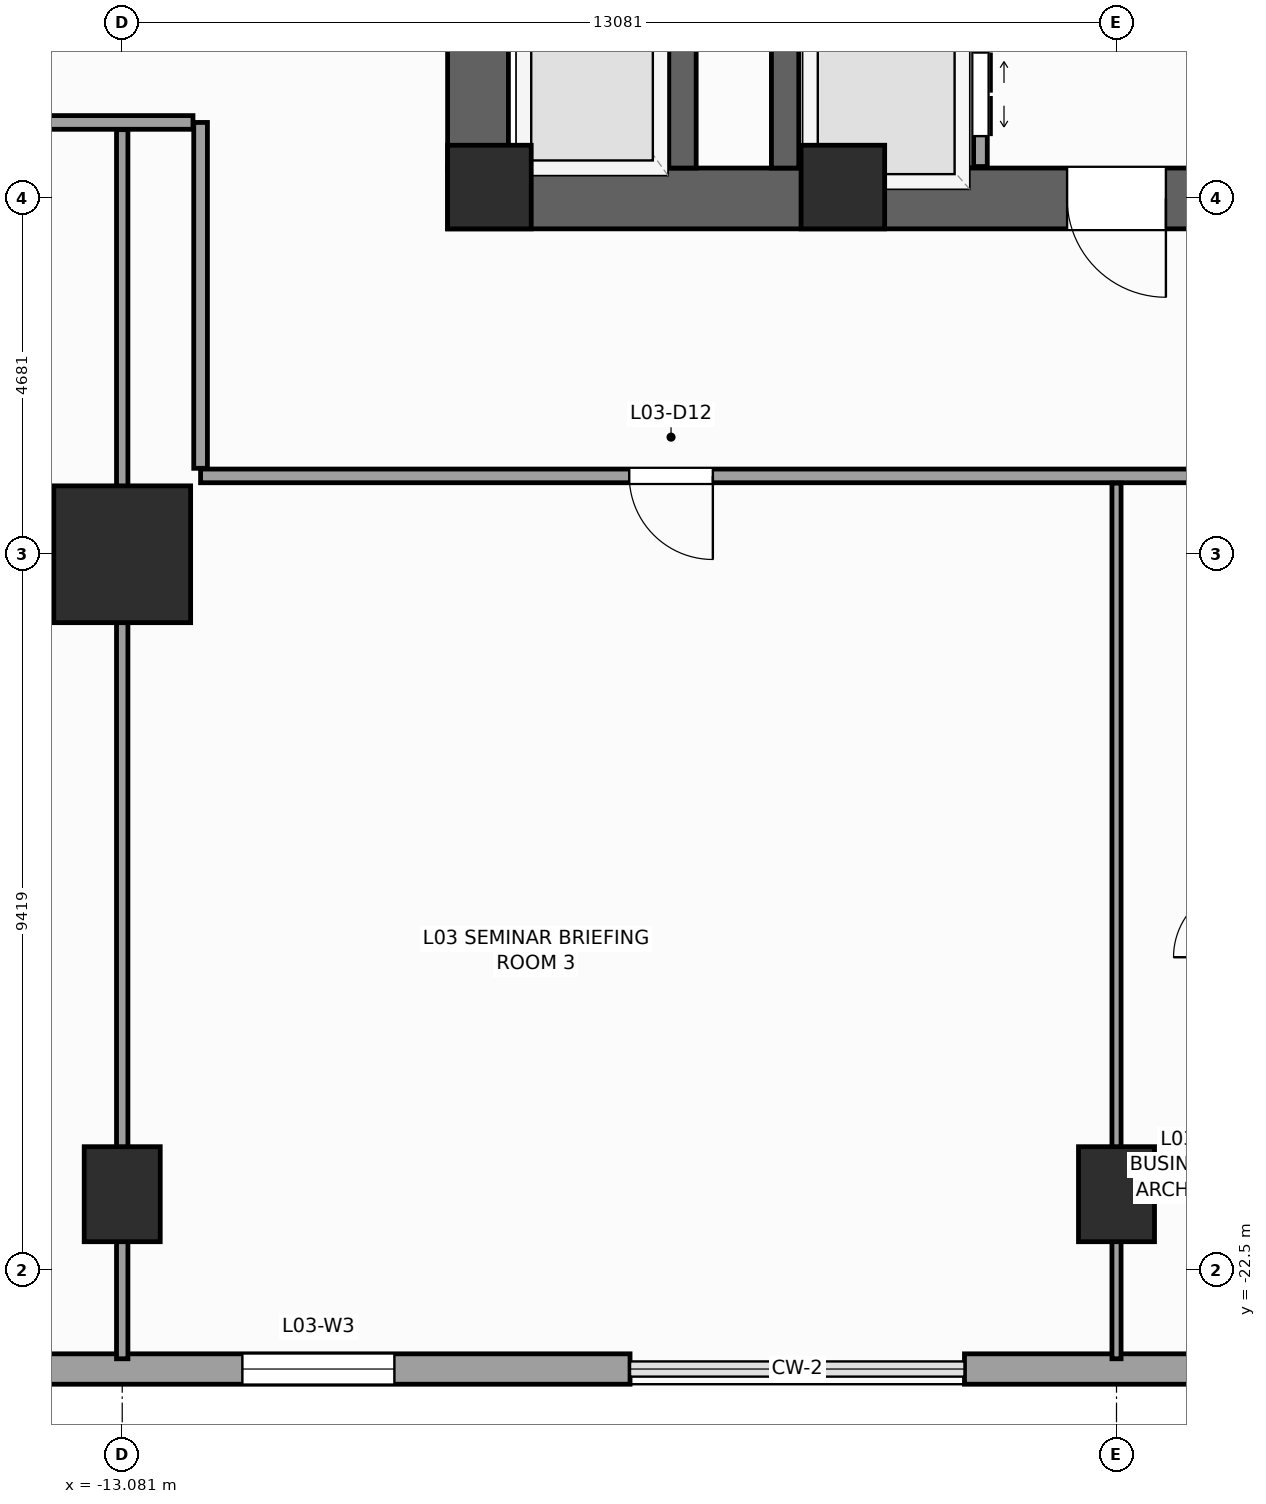
"""IFC4 building model, lengths in metres.
Left out: names, types, materials, properties, quantities, classifications, styles, units other than length and angle.
Written with IfcOpenShell. Run it as: python <this file> out.ifc"""

import sys

from ifc_helpers import new_model, si_unit, direction, frame, frame_2d, origin, origin_2d, place, context, subcontext, project, spatial, rectangle, extrude, source, transform, mapped, element, fill, save


model = new_model("IFC4")
c1 = context("Model", 3, precision=1e-05, world=origin(), true_north=direction((0.0, 1.0)))
c2 = subcontext(c1, "Body", "Model", "MODEL_VIEW")
j1 = project(units=[si_unit("LENGTHUNIT", "METRE"), si_unit("PLANEANGLEUNIT", "RADIAN")], contexts=[c1])
p1 = place(None, origin())
s1 = spatial("IfcSite", under=j1, at=p1, CompositionType="ELEMENT")
p2 = place(p1, origin())
s2 = spatial("IfcBuilding", under=s1, at=p2, CompositionType="ELEMENT")
p3 = place(p2, frame((0.0, 0.0, 16.0)))
s3 = spatial("IfcBuildingStorey", under=s2, at=p3, CompositionType="ELEMENT", Elevation=16.0)
p4 = place(p3, frame((-8.8, -8.4, 0.0), z_axis=(0.0, 0.0, 1.0), x_axis=(1.0, 0.0, 0.0)))
e1 = element("IfcWall", 1, at=p4, inside=s3, PredefinedType="SHEAR", context=c2, shape_type="SweptSolid", body=[
    extrude(rectangle(XDim=17.6, YDim=0.8, at=frame_2d((8.8, 0.0))), origin(), (0.0, 0.0, 1.0), 5.0),
])
p5 = place(p4, frame((8.15, 0.0, 0.0)))
e2 = element("IfcOpeningElement", 2, at=p5, cuts=e1, PredefinedType="OPENING", context=c2, shape_type="SweptSolid", body=[
    extrude(rectangle(XDim=1.3, YDim=2.2, at=frame_2d((0.65, 1.1))), frame((0.0, 0.41, 0.0), z_axis=(0.0, -1.0, 0.0), x_axis=(1.0, 0.0, 0.0)), (0.0, 0.0, 1.0), 0.82),
])
p6 = place(p3, frame((-8.4, -8.0, 0.0), z_axis=(0.0, 0.0, 1.0), x_axis=(0.0, 1.0, 0.0)))
e3 = element("IfcWall", 3, at=p6, inside=s3, PredefinedType="SHEAR", context=c2, shape_type="SweptSolid", body=[
    extrude(rectangle(XDim=16.0, YDim=0.8, at=frame_2d((8.0, 0.0))), origin(), (0.0, 0.0, 1.0), 5.0),
])
p7 = place(p6, frame((4.69, 0.0, 0.0)))
e4 = element("IfcOpeningElement", 4, at=p7, cuts=e3, PredefinedType="OPENING", context=c2, shape_type="SweptSolid", body=[
    extrude(rectangle(XDim=1.3, YDim=2.2, at=frame_2d((0.65, 1.1))), frame((0.0, 0.41, 0.0), z_axis=(0.0, -1.0, 0.0), x_axis=(1.0, 0.0, 0.0)), (0.0, 0.0, 1.0), 0.82),
])
p8 = place(p3, frame((-4.36, -8.0, 0.0), z_axis=(0.0, 0.0, 1.0), x_axis=(0.0, 1.0, 0.0)))
e5 = element("IfcWall", 5, at=p8, inside=s3, PredefinedType="SHEAR", context=c2, shape_type="SweptSolid", body=[
    extrude(rectangle(XDim=16.0, YDim=0.36, at=frame_2d((8.0, 0.0))), origin(), (0.0, 0.0, 1.0), 5.0),
])
p9 = place(p3, frame((-5.71, -8.0, 0.0), z_axis=(0.0, 0.0, 1.0), x_axis=(0.0, 1.0, 0.0)))
e6 = element("IfcWall", 6, at=p9, inside=s3, PredefinedType="SHEAR", context=c2, shape_type="SweptSolid", body=[
    extrude(rectangle(XDim=2.54, YDim=0.36, at=frame_2d((1.27, 0.0))), origin(), (0.0, 0.0, 1.0), 5.0),
])
m1 = source(origin(), c2, "Body", "SweptSolid", [
    extrude(rectangle(XDim=1.1, YDim=1.1, at=origin_2d()), origin(), (0.0, 0.0, 1.0), 5.0),
])
for number, where, z_axis, x_axis in (
    (7, (-8.25, -8.25, 0.0), (0.0, 0.0, 1.0), (1.0, 0.0, 0.0)),
    (8, (-3.6, -8.25, 0.0), (0.0, 0.0, 1.0), (1.0, 0.0, 0.0)),
):
    element("IfcColumn", number, at=place(p3, frame(where, z_axis=z_axis, x_axis=x_axis)), inside=s3, PredefinedType="PILASTER", context=c2, shape_type="MappedRepresentation", body=[
        mapped(m1, transform((0.0, 0.0, 0.0), scale=1.0)),
    ])
m2 = source(origin(), c2, "Body", "SweptSolid", [
    extrude(rectangle(XDim=1.8, YDim=1.8, at=origin_2d()), origin(), (0.0, 0.0, 1.0), 5.0),
])
p10 = place(p3, frame((-13.081, -13.081, 0.0), z_axis=(0.0, 0.0, 1.0), x_axis=(1.0, 0.0, 0.0)))
e9 = element("IfcColumn", 9, at=p10, inside=s3, PredefinedType="COLUMN", context=c2, shape_type="MappedRepresentation", body=[
    mapped(m2, transform((0.0, 0.0, 0.0), scale=1.0)),
])
m3 = source(origin(), c2, "Body", "SweptSolid", [
    extrude(rectangle(XDim=1.0, YDim=1.25, at=origin_2d()), origin(), (0.0, 0.0, 1.0), 5.0),
])
for number, where, z_axis, x_axis in (
    (10, (-13.081, -21.5, 0.0), (0.0, 0.0, 1.0), (1.0, 0.0, 0.0)),
    (11, (0.0, -21.5, 0.0), (0.0, 0.0, 1.0), (1.0, 0.0, 0.0)),
):
    element("IfcColumn", number, at=place(p3, frame(where, z_axis=z_axis, x_axis=x_axis)), inside=s3, PredefinedType="COLUMN", context=c2, shape_type="MappedRepresentation", body=[
        mapped(m3, transform((0.0, 0.0, 0.0), scale=1.0)),
    ])
p11 = place(p3, frame((-33.0, -23.8, 0.0), z_axis=(0.0, 0.0, 1.0), x_axis=(1.0, 0.0, 0.0)))
e12 = element("IfcWall", 12, at=p11, inside=s3, PredefinedType="STANDARD", context=c2, shape_type="SweptSolid", body=[
    extrude(rectangle(XDim=26.6, YDim=0.4, at=frame_2d((13.3, 0.0))), origin(), (0.0, 0.0, 1.0), 4.66),
])
p12 = place(p11, frame((11.0, 0.0, 0.85)))
e13 = element("IfcOpeningElement", 13, at=p12, cuts=e12, PredefinedType="OPENING", context=c2, shape_type="SweptSolid", body=[
    extrude(rectangle(XDim=2.0, YDim=2.8, at=frame_2d((1.0, 1.4))), frame((0.0, 0.21, 0.0), z_axis=(0.0, -1.0, 0.0), x_axis=(1.0, 0.0, 0.0)), (0.0, 0.0, 1.0), 0.42),
])
p13 = place(p11, frame((16.0, 0.0, 0.85)))
e14 = element("IfcOpeningElement", 14, at=p13, cuts=e12, PredefinedType="OPENING", context=c2, shape_type="SweptSolid", body=[
    extrude(rectangle(XDim=2.0, YDim=2.8, at=frame_2d((1.0, 1.4))), frame((0.0, 0.21, 0.0), z_axis=(0.0, -1.0, 0.0), x_axis=(1.0, 0.0, 0.0)), (0.0, 0.0, 1.0), 0.42),
])
p14 = place(p11, frame((21.5, 0.0, 0.85)))
e15 = element("IfcOpeningElement", 15, at=p14, cuts=e12, PredefinedType="OPENING", context=c2, shape_type="SweptSolid", body=[
    extrude(rectangle(XDim=2.0, YDim=2.8, at=frame_2d((1.0, 1.4))), frame((0.0, 0.21, 0.0), z_axis=(0.0, -1.0, 0.0), x_axis=(1.0, 0.0, 0.0)), (0.0, 0.0, 1.0), 0.42),
])
p15 = place(p3, frame((-2.0, -23.8, 0.0), z_axis=(0.0, 0.0, 1.0), x_axis=(1.0, 0.0, 0.0)))
e16 = element("IfcWall", 16, at=p15, inside=s3, PredefinedType="STANDARD", context=c2, shape_type="SweptSolid", body=[
    extrude(rectangle(XDim=35.0, YDim=0.4, at=frame_2d((17.5, 0.0))), origin(), (0.0, 0.0, 1.0), 4.66),
])
p16 = place(p15, frame((11.5, 0.0, 0.85)))
e17 = element("IfcOpeningElement", 17, at=p16, cuts=e16, PredefinedType="OPENING", context=c2, shape_type="SweptSolid", body=[
    extrude(rectangle(XDim=2.0, YDim=2.8, at=frame_2d((1.0, 1.4))), frame((0.0, 0.21, 0.0), z_axis=(0.0, -1.0, 0.0), x_axis=(1.0, 0.0, 0.0)), (0.0, 0.0, 1.0), 0.42),
])
p17 = place(p15, frame((17.0, 0.0, 0.85)))
e18 = element("IfcOpeningElement", 18, at=p17, cuts=e16, PredefinedType="OPENING", context=c2, shape_type="SweptSolid", body=[
    extrude(rectangle(XDim=2.0, YDim=2.8, at=frame_2d((1.0, 1.4))), frame((0.0, 0.21, 0.0), z_axis=(0.0, -1.0, 0.0), x_axis=(1.0, 0.0, 0.0)), (0.0, 0.0, 1.0), 0.42),
])
p18 = place(p15, frame((22.0, 0.0, 0.85)))
e19 = element("IfcOpeningElement", 19, at=p18, cuts=e16, PredefinedType="OPENING", context=c2, shape_type="SweptSolid", body=[
    extrude(rectangle(XDim=2.0, YDim=2.8, at=frame_2d((1.0, 1.4))), frame((0.0, 0.21, 0.0), z_axis=(0.0, -1.0, 0.0), x_axis=(1.0, 0.0, 0.0)), (0.0, 0.0, 1.0), 0.42),
])
p19 = place(p3, frame((-1.79, -7.98, 0.0), z_axis=(0.0, 0.0, 1.0), x_axis=(0.0, 1.0, 0.0)))
e20 = element("IfcWall", 20, at=p19, inside=s3, PredefinedType="PARTITIONING", context=c2, shape_type="SweptSolid", body=[
    extrude(rectangle(XDim=12.38, YDim=0.18, at=frame_2d((6.19, 0.0))), origin(), (0.0, 0.0, 1.0), 4.66),
])
p20 = place(p19, frame((0.4, 0.0, 0.0)))
e21 = element("IfcOpeningElement", 21, at=p20, cuts=e20, PredefinedType="OPENING", context=c2, shape_type="SweptSolid", body=[
    extrude(rectangle(XDim=1.1, YDim=2.2, at=frame_2d((0.55, 1.1))), frame((0.0, 0.1, 0.0), z_axis=(0.0, -1.0, 0.0), x_axis=(1.0, 0.0, 0.0)), (0.0, 0.0, 1.0), 0.2),
])
p21 = place(p19, frame((2.46, 0.0, 0.0)))
e22 = element("IfcOpeningElement", 22, at=p21, cuts=e20, PredefinedType="OPENING", context=c2, shape_type="SweptSolid", body=[
    extrude(rectangle(XDim=1.1, YDim=2.2, at=frame_2d((0.55, 1.1))), frame((0.0, 0.1, 0.0), z_axis=(0.0, -1.0, 0.0), x_axis=(1.0, 0.0, 0.0)), (0.0, 0.0, 1.0), 0.2),
])
p22 = place(p3, frame((-12.05, -12.05, 0.0), z_axis=(0.0, 0.0, 1.0), x_axis=(1.0, 0.0, 0.0)))
e23 = element("IfcWall", 23, at=p22, inside=s3, PredefinedType="PARTITIONING", context=c2, shape_type="SweptSolid", body=[
    extrude(rectangle(XDim=13.75, YDim=0.18, at=frame_2d((6.875, 0.0))), origin(), (0.0, 0.0, 1.0), 4.66),
])
p23 = place(p22, frame((5.639, 0.0, 0.0)))
e24 = element("IfcOpeningElement", 24, at=p23, cuts=e23, PredefinedType="OPENING", context=c2, shape_type="SweptSolid", body=[
    extrude(rectangle(XDim=1.1, YDim=2.2, at=frame_2d((0.55, 1.1))), frame((0.0, 0.1, 0.0), z_axis=(0.0, -1.0, 0.0), x_axis=(1.0, 0.0, 0.0)), (0.0, 0.0, 1.0), 0.2),
])
p24 = place(p3, frame((-12.05, -11.95, 0.0), z_axis=(0.0, 0.0, 1.0), x_axis=(0.0, 1.0, 0.0)))
e25 = element("IfcWall", 25, at=p24, inside=s3, PredefinedType="PARTITIONING", context=c2, shape_type="SweptSolid", body=[
    extrude(rectangle(XDim=4.55, YDim=0.18, at=frame_2d((2.275, 0.0))), origin(), (0.0, 0.0, 1.0), 4.66),
])
p25 = place(p3, frame((-32.665, -7.4, 0.0), z_axis=(0.0, 0.0, 1.0), x_axis=(1.0, 0.0, 0.0)))
e26 = element("IfcWall", 26, at=p25, inside=s3, PredefinedType="PARTITIONING", context=c2, shape_type="SweptSolid", body=[
    extrude(rectangle(XDim=20.515, YDim=0.18, at=frame_2d((10.258, 0.0))), origin(), (0.0, 0.0, 1.0), 4.66),
])
p26 = place(p25, frame((1.455, 0.0, 0.0)))
e27 = element("IfcOpeningElement", 27, at=p26, cuts=e26, PredefinedType="OPENING", context=c2, shape_type="SweptSolid", body=[
    extrude(rectangle(XDim=0.95, YDim=2.1, at=frame_2d((0.475, 1.05))), frame((0.0, 0.1, 0.0), z_axis=(0.0, -1.0, 0.0), x_axis=(1.0, 0.0, 0.0)), (0.0, 0.0, 1.0), 0.2),
])
p27 = place(p25, frame((10.701, 0.0, 0.0)))
e28 = element("IfcOpeningElement", 28, at=p27, cuts=e26, PredefinedType="OPENING", context=c2, shape_type="SweptSolid", body=[
    extrude(rectangle(XDim=1.1, YDim=2.2, at=frame_2d((0.55, 1.1))), frame((0.0, 0.1, 0.0), z_axis=(0.0, -1.0, 0.0), x_axis=(1.0, 0.0, 0.0)), (0.0, 0.0, 1.0), 0.2),
])
p28 = place(p3, frame((-13.081, -23.665, 0.0), z_axis=(0.0, 0.0, 1.0), x_axis=(0.0, 1.0, 0.0)))
e29 = element("IfcWall", 29, at=p28, inside=s3, PredefinedType="PARTITIONING", context=c2, shape_type="SweptSolid", body=[
    extrude(rectangle(XDim=16.17, YDim=0.15, at=frame_2d((8.085, 0.0))), origin(), (0.0, 0.0, 1.0), 3.652),
])
p29 = place(p3, frame((0.0, -23.665, 0.0), z_axis=(0.0, 0.0, 1.0), x_axis=(0.0, 1.0, 0.0)))
e30 = element("IfcWall", 30, at=p29, inside=s3, PredefinedType="PARTITIONING", context=c2, shape_type="SweptSolid", body=[
    extrude(rectangle(XDim=11.52, YDim=0.12, at=frame_2d((5.76, 0.0))), origin(), (0.0, 0.0, 1.0), 3.95),
])
m4 = source(origin(), c2, "Body", "SweptSolid", [
    extrude(rectangle(XDim=2.0, YDim=2.8, at=frame_2d((1.0, 1.4))), frame((0.0, 0.03, 0.0), z_axis=(0.0, -1.0, 0.0), x_axis=(1.0, 0.0, 0.0)), (0.0, 0.0, 1.0), 0.06),
])
p30 = place(p14, origin())
e31 = element("IfcWindow", 31, at=p30, inside=s3, PartitioningType="SINGLE_PANEL", PredefinedType="WINDOW", context=c2, shape_type="MappedRepresentation", body=[
    mapped(m4, transform((0.0, 0.0, 0.0), scale=1.0)),
])
fill(e15, e31)
m5 = source(origin(), c2, "Body", "SweptSolid", [
    extrude(rectangle(XDim=1.3, YDim=2.2, at=frame_2d((0.65, 1.1))), frame((0.0, 0.025, 0.0), z_axis=(0.0, -1.0, 0.0), x_axis=(1.0, 0.0, 0.0)), (0.0, 0.0, 1.0), 0.05),
])
p31 = place(p5, frame((1.3, 0.0, 0.0), z_axis=(0.0, 0.0, 1.0), x_axis=(-1.0, 0.0, 0.0)))
e32 = element("IfcDoor", 32, at=p31, inside=s3, OperationType="SINGLE_SWING_RIGHT", PredefinedType="DOOR", context=c2, shape_type="MappedRepresentation", body=[
    mapped(m5, transform((0.0, 0.0, 0.0), scale=1.0)),
])
fill(e2, e32)
m6 = source(origin(), c2, "Body", "SweptSolid", [
    extrude(rectangle(XDim=1.1, YDim=2.2, at=frame_2d((0.55, 1.1))), frame((0.0, 0.025, 0.0), z_axis=(0.0, -1.0, 0.0), x_axis=(1.0, 0.0, 0.0)), (0.0, 0.0, 1.0), 0.05),
])
p32 = place(p20, frame((1.1, 0.0, 0.0), z_axis=(0.0, 0.0, 1.0), x_axis=(-1.0, 0.0, 0.0)))
e33 = element("IfcDoor", 33, at=p32, inside=s3, OperationType="DOUBLE_DOOR_SLIDING", PredefinedType="DOOR", context=c2, shape_type="MappedRepresentation", body=[
    mapped(m6, transform((0.0, 0.0, 0.0), scale=1.0)),
])
fill(e21, e33)
p33 = place(p23, frame((1.1, 0.0, 0.0), z_axis=(0.0, 0.0, 1.0), x_axis=(-1.0, 0.0, 0.0)))
e34 = element("IfcDoor", 34, at=p33, inside=s3, OperationType="SINGLE_SWING_RIGHT", PredefinedType="DOOR", context=c2, shape_type="MappedRepresentation", body=[
    mapped(m6, transform((0.0, 0.0, 0.0), scale=1.0)),
])
fill(e24, e34)
save(model, sys.argv[1])
